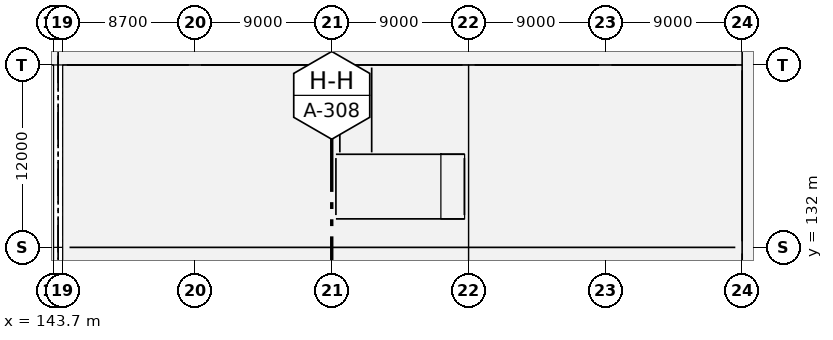
"""IFC4 building model, lengths in metres.
Left out: names, types, materials, properties, quantities, classifications, styles, units other than length and angle.
Written with IfcOpenShell. Run it as: python <this file> out.ifc"""

import sys

from ifc_helpers import new_model, si_unit, direction, frame, frame_2d, origin, origin_2d, place, context, subcontext, project, spatial, rectangle, extrude, element, fill, save


model = new_model("IFC4")
c1 = context("Model", 3, precision=1e-05, world=origin(), true_north=direction((0.0, 1.0)))
c2 = subcontext(c1, "Body", "Model", "MODEL_VIEW")
j1 = project(units=[si_unit("LENGTHUNIT", "METRE"), si_unit("PLANEANGLEUNIT", "RADIAN")], contexts=[c1])
p1 = place(None, origin())
s1 = spatial("IfcSite", under=j1, at=p1, CompositionType="ELEMENT")
p2 = place(p1, origin())
s2 = spatial("IfcBuilding", under=s1, at=p2, CompositionType="ELEMENT")
p3 = place(p2, origin())
s3 = spatial("IfcBuildingStorey", under=s2, at=p3, CompositionType="ELEMENT", Elevation=0.0)
for number, where, z_axis, x_axis in (
    (1, (143.7, 132.0, -0.5), (0.0, 0.0, 1.0), (1.0, 0.0, 0.0)),
    (2, (143.7, 144.0, -0.5), (0.0, 0.0, 1.0), (1.0, 0.0, 0.0)),
    (3, (144.3, 132.0, -0.5), (0.0, 0.0, 1.0), (1.0, 0.0, 0.0)),
    (4, (144.3, 144.0, -0.5), (0.0, 0.0, 1.0), (1.0, 0.0, 0.0)),
):
    element("IfcColumn", number, at=place(p3, frame(where, z_axis=z_axis, x_axis=x_axis)), inside=s3, PredefinedType="COLUMN", context=c2, shape_type="SweptSolid", body=[
        extrude(rectangle(XDim=0.55, YDim=0.75, at=origin_2d()), origin(), (0.0, 0.0, 1.0), 6.8),
    ])
p4 = place(p3, frame((153.0, 132.0, -0.5), z_axis=(0.0, 0.0, 1.0), x_axis=(1.0, 0.0, 0.0)))
e5 = element("IfcColumn", 5, at=p4, inside=s3, PredefinedType="COLUMN", context=c2, shape_type="SweptSolid", body=[
    extrude(rectangle(XDim=0.8, YDim=0.8, at=origin_2d()), origin(), (0.0, 0.0, 1.0), 6.8),
])
p5 = place(p3, frame((153.0, 144.0, -0.5), z_axis=(0.0, 0.0, 1.0), x_axis=(1.0, 0.0, 0.0)))
e6 = element("IfcColumn", 6, at=p5, inside=s3, PredefinedType="COLUMN", context=c2, shape_type="SweptSolid", body=[
    extrude(rectangle(XDim=0.8, YDim=0.7, at=origin_2d()), origin(), (0.0, 0.0, 1.0), 6.8),
])
p6 = place(p3, frame((162.0, 132.0, -0.5), z_axis=(0.0, 0.0, 1.0), x_axis=(1.0, 0.0, 0.0)))
e7 = element("IfcColumn", 7, at=p6, inside=s3, PredefinedType="COLUMN", context=c2, shape_type="SweptSolid", body=[
    extrude(rectangle(XDim=0.8, YDim=0.8, at=origin_2d()), origin(), (0.0, 0.0, 1.0), 6.8),
])
p7 = place(p3, frame((162.0, 144.0, -0.5), z_axis=(0.0, 0.0, 1.0), x_axis=(1.0, 0.0, 0.0)))
e8 = element("IfcColumn", 8, at=p7, inside=s3, PredefinedType="COLUMN", context=c2, shape_type="SweptSolid", body=[
    extrude(rectangle(XDim=0.8, YDim=0.7, at=origin_2d()), origin(), (0.0, 0.0, 1.0), 6.8),
])
p8 = place(p3, frame((171.0, 132.0, -0.5), z_axis=(0.0, 0.0, 1.0), x_axis=(1.0, 0.0, 0.0)))
e9 = element("IfcColumn", 9, at=p8, inside=s3, PredefinedType="COLUMN", context=c2, shape_type="SweptSolid", body=[
    extrude(rectangle(XDim=0.8, YDim=0.8, at=origin_2d()), origin(), (0.0, 0.0, 1.0), 6.8),
])
p9 = place(p3, frame((171.0, 144.0, -0.5), z_axis=(0.0, 0.0, 1.0), x_axis=(1.0, 0.0, 0.0)))
e10 = element("IfcColumn", 10, at=p9, inside=s3, PredefinedType="COLUMN", context=c2, shape_type="SweptSolid", body=[
    extrude(rectangle(XDim=0.8, YDim=0.7, at=origin_2d()), origin(), (0.0, 0.0, 1.0), 6.8),
])
for number, where, z_axis, x_axis in (
    (11, (180.0, 132.0, -0.5), (0.0, 0.0, 1.0), (1.0, 0.0, 0.0)),
    (12, (180.0, 144.0, -0.5), (0.0, 0.0, 1.0), (1.0, 0.0, 0.0)),
    (13, (189.0, 132.0, -0.5), (0.0, 0.0, 1.0), (1.0, 0.0, 0.0)),
):
    element("IfcColumn", number, at=place(p3, frame(where, z_axis=z_axis, x_axis=x_axis)), inside=s3, PredefinedType="COLUMN", context=c2, shape_type="SweptSolid", body=[
        extrude(rectangle(XDim=0.8, YDim=0.8, at=origin_2d()), origin(), (0.0, 0.0, 1.0), 6.8),
    ])
p10 = place(p3, frame((189.0, 144.0, -0.5), z_axis=(0.0, 0.0, 1.0), x_axis=(1.0, 0.0, 0.0)))
e14 = element("IfcColumn", 14, at=p10, inside=s3, PredefinedType="COLUMN", context=c2, shape_type="SweptSolid", body=[
    extrude(rectangle(XDim=0.8, YDim=0.7, at=origin_2d()), origin(), (0.0, 0.0, 1.0), 6.8),
])
p11 = place(p3, frame((144.575, 144.0, 0.0), z_axis=(0.0, 0.0, 1.0), x_axis=(1.0, 0.0, 0.0)))
e15 = element("IfcWall", 15, at=p11, inside=s3, PredefinedType="SOLIDWALL", context=c2, shape_type="SweptSolid", body=[
    extrude(rectangle(XDim=8.025, YDim=0.34, at=frame_2d((4.013, 0.0))), origin(), (0.0, 0.0, 1.0), 5.12),
])
p12 = place(p11, frame((2.812, 0.0, 0.0)))
e16 = element("IfcOpeningElement", 16, at=p12, cuts=e15, PredefinedType="OPENING", context=c2, shape_type="SweptSolid", body=[
    extrude(rectangle(XDim=2.4, YDim=3.1, at=frame_2d((1.2, 1.55))), frame((0.0, 0.18, 0.0), z_axis=(0.0, -1.0, 0.0), x_axis=(1.0, 0.0, 0.0)), (0.0, 0.0, 1.0), 0.36),
])
p13 = place(p3, frame((153.4, 144.0, 0.0), z_axis=(0.0, 0.0, 1.0), x_axis=(1.0, 0.0, 0.0)))
e17 = element("IfcWall", 17, at=p13, inside=s3, PredefinedType="SOLIDWALL", context=c2, shape_type="SweptSolid", body=[
    extrude(rectangle(XDim=8.2, YDim=0.34, at=frame_2d((4.1, 0.0))), origin(), (0.0, 0.0, 1.0), 5.12),
])
p14 = place(p13, frame((1.533, 0.0, 0.9)))
e18 = element("IfcOpeningElement", 18, at=p14, cuts=e17, PredefinedType="OPENING", context=c2, shape_type="SweptSolid", body=[
    extrude(rectangle(XDim=2.4, YDim=3.5, at=frame_2d((1.2, 1.75))), frame((0.0, 0.18, 0.0), z_axis=(0.0, -1.0, 0.0), x_axis=(1.0, 0.0, 0.0)), (0.0, 0.0, 1.0), 0.36),
])
p15 = place(p13, frame((4.267, 0.0, 0.9)))
e19 = element("IfcOpeningElement", 19, at=p15, cuts=e17, PredefinedType="OPENING", context=c2, shape_type="SweptSolid", body=[
    extrude(rectangle(XDim=2.4, YDim=3.5, at=frame_2d((1.2, 1.75))), frame((0.0, 0.18, 0.0), z_axis=(0.0, -1.0, 0.0), x_axis=(1.0, 0.0, 0.0)), (0.0, 0.0, 1.0), 0.36),
])
p16 = place(p3, frame((162.4, 144.0, 0.0), z_axis=(0.0, 0.0, 1.0), x_axis=(1.0, 0.0, 0.0)))
e20 = element("IfcWall", 20, at=p16, inside=s3, PredefinedType="SOLIDWALL", context=c2, shape_type="SweptSolid", body=[
    extrude(rectangle(XDim=8.2, YDim=0.34, at=frame_2d((4.1, 0.0))), origin(), (0.0, 0.0, 1.0), 5.12),
])
p17 = place(p16, frame((2.9, 0.0, 0.0)))
e21 = element("IfcOpeningElement", 21, at=p17, cuts=e20, PredefinedType="OPENING", context=c2, shape_type="SweptSolid", body=[
    extrude(rectangle(XDim=2.4, YDim=3.1, at=frame_2d((1.2, 1.55))), frame((0.0, 0.18, 0.0), z_axis=(0.0, -1.0, 0.0), x_axis=(1.0, 0.0, 0.0)), (0.0, 0.0, 1.0), 0.36),
])
p18 = place(p16, frame((0.4, 0.0, 0.0)))
e22 = element("IfcOpeningElement", 22, at=p18, cuts=e20, PredefinedType="OPENING", context=c2, shape_type="SweptSolid", body=[
    extrude(rectangle(XDim=1.2, YDim=2.25, at=frame_2d((0.6, 1.125))), frame((0.0, 0.18, 0.0), z_axis=(0.0, -1.0, 0.0), x_axis=(1.0, 0.0, 0.0)), (0.0, 0.0, 1.0), 0.36),
])
p19 = place(p3, frame((171.4, 144.0, 0.0), z_axis=(0.0, 0.0, 1.0), x_axis=(1.0, 0.0, 0.0)))
e23 = element("IfcWall", 23, at=p19, inside=s3, PredefinedType="SOLIDWALL", context=c2, shape_type="SweptSolid", body=[
    extrude(rectangle(XDim=8.2, YDim=0.34, at=frame_2d((4.1, 0.0))), origin(), (0.0, 0.0, 1.0), 5.12),
])
p20 = place(p19, frame((1.533, 0.0, 0.9)))
e24 = element("IfcOpeningElement", 24, at=p20, cuts=e23, PredefinedType="OPENING", context=c2, shape_type="SweptSolid", body=[
    extrude(rectangle(XDim=2.4, YDim=3.5, at=frame_2d((1.2, 1.75))), frame((0.0, 0.18, 0.0), z_axis=(0.0, -1.0, 0.0), x_axis=(1.0, 0.0, 0.0)), (0.0, 0.0, 1.0), 0.36),
])
p21 = place(p19, frame((4.267, 0.0, 0.9)))
e25 = element("IfcOpeningElement", 25, at=p21, cuts=e23, PredefinedType="OPENING", context=c2, shape_type="SweptSolid", body=[
    extrude(rectangle(XDim=2.4, YDim=3.5, at=frame_2d((1.2, 1.75))), frame((0.0, 0.18, 0.0), z_axis=(0.0, -1.0, 0.0), x_axis=(1.0, 0.0, 0.0)), (0.0, 0.0, 1.0), 0.36),
])
p22 = place(p3, frame((180.4, 144.0, 0.0), z_axis=(0.0, 0.0, 1.0), x_axis=(1.0, 0.0, 0.0)))
e26 = element("IfcWall", 26, at=p22, inside=s3, PredefinedType="SOLIDWALL", context=c2, shape_type="SweptSolid", body=[
    extrude(rectangle(XDim=8.2, YDim=0.34, at=frame_2d((4.1, 0.0))), origin(), (0.0, 0.0, 1.0), 5.12),
])
p23 = place(p22, frame((1.533, 0.0, 0.9)))
e27 = element("IfcOpeningElement", 27, at=p23, cuts=e26, PredefinedType="OPENING", context=c2, shape_type="SweptSolid", body=[
    extrude(rectangle(XDim=2.4, YDim=3.5, at=frame_2d((1.2, 1.75))), frame((0.0, 0.18, 0.0), z_axis=(0.0, -1.0, 0.0), x_axis=(1.0, 0.0, 0.0)), (0.0, 0.0, 1.0), 0.36),
])
p24 = place(p22, frame((4.267, 0.0, 0.9)))
e28 = element("IfcOpeningElement", 28, at=p24, cuts=e26, PredefinedType="OPENING", context=c2, shape_type="SweptSolid", body=[
    extrude(rectangle(XDim=2.4, YDim=3.5, at=frame_2d((1.2, 1.75))), frame((0.0, 0.18, 0.0), z_axis=(0.0, -1.0, 0.0), x_axis=(1.0, 0.0, 0.0)), (0.0, 0.0, 1.0), 0.36),
])
p25 = place(p3, frame((189.0, 120.0, 0.0), z_axis=(0.0, 0.0, 1.0), x_axis=(0.0, 1.0, 0.0)))
e29 = element("IfcWall", 29, at=p25, inside=s3, PredefinedType="SOLIDWALL", context=c2, shape_type="SweptSolid", body=[
    extrude(rectangle(XDim=11.6, YDim=0.34, at=frame_2d((5.8, 0.0))), origin(), (0.0, 0.0, 1.0), 6.3),
])
p26 = place(p25, frame((2.667, 0.0, 0.9)))
e30 = element("IfcOpeningElement", 30, at=p26, cuts=e29, PredefinedType="OPENING", context=c2, shape_type="SweptSolid", body=[
    extrude(rectangle(XDim=2.4, YDim=3.5, at=frame_2d((1.2, 1.75))), frame((0.0, 0.18, 0.0), z_axis=(0.0, -1.0, 0.0), x_axis=(1.0, 0.0, 0.0)), (0.0, 0.0, 1.0), 0.36),
])
p27 = place(p25, frame((6.533, 0.0, 0.9)))
e31 = element("IfcOpeningElement", 31, at=p27, cuts=e29, PredefinedType="OPENING", context=c2, shape_type="SweptSolid", body=[
    extrude(rectangle(XDim=2.4, YDim=3.5, at=frame_2d((1.2, 1.75))), frame((0.0, 0.18, 0.0), z_axis=(0.0, -1.0, 0.0), x_axis=(1.0, 0.0, 0.0)), (0.0, 0.0, 1.0), 0.36),
])
p28 = place(p3, frame((189.0, 132.4, 0.0), z_axis=(0.0, 0.0, 1.0), x_axis=(0.0, 1.0, 0.0)))
e32 = element("IfcWall", 32, at=p28, inside=s3, PredefinedType="SOLIDWALL", context=c2, shape_type="SweptSolid", body=[
    extrude(rectangle(XDim=11.25, YDim=0.34, at=frame_2d((5.625, 0.0))), origin(), (0.0, 0.0, 1.0), 4.97),
])
p29 = place(p28, frame((2.55, 0.0, 0.9)))
e33 = element("IfcOpeningElement", 33, at=p29, cuts=e32, PredefinedType="OPENING", context=c2, shape_type="SweptSolid", body=[
    extrude(rectangle(XDim=2.4, YDim=3.5, at=frame_2d((1.2, 1.75))), frame((0.0, 0.18, 0.0), z_axis=(0.0, -1.0, 0.0), x_axis=(1.0, 0.0, 0.0)), (0.0, 0.0, 1.0), 0.36),
])
p30 = place(p28, frame((6.3, 0.0, 0.9)))
e34 = element("IfcOpeningElement", 34, at=p30, cuts=e32, PredefinedType="OPENING", context=c2, shape_type="SweptSolid", body=[
    extrude(rectangle(XDim=2.4, YDim=3.5, at=frame_2d((1.2, 1.75))), frame((0.0, 0.18, 0.0), z_axis=(0.0, -1.0, 0.0), x_axis=(1.0, 0.0, 0.0)), (0.0, 0.0, 1.0), 0.36),
])
p31 = place(p3, frame((162.275, 133.875, -0.5), z_axis=(0.0, 0.0, 1.0), x_axis=(1.0, 0.0, 0.0)))
e35 = element("IfcWall", 35, at=p31, inside=s3, PredefinedType="SOLIDWALL", context=c2, shape_type="SweptSolid", body=[
    extrude(rectangle(XDim=8.45, YDim=0.25, at=frame_2d((4.225, 0.0))), origin(), (0.0, 0.0, 1.0), 6.8),
])
p32 = place(p3, frame((162.275, 138.125, -0.5), z_axis=(0.0, 0.0, 1.0), x_axis=(1.0, 0.0, 0.0)))
e36 = element("IfcWall", 36, at=p32, inside=s3, PredefinedType="SOLIDWALL", context=c2, shape_type="SweptSolid", body=[
    extrude(rectangle(XDim=8.45, YDim=0.25, at=frame_2d((4.225, 0.0))), origin(), (0.0, 0.0, 1.0), 6.8),
])
p33 = place(p32, frame((0.525, 0.0, 0.5)))
e37 = element("IfcOpeningElement", 37, at=p33, cuts=e36, PredefinedType="OPENING", context=c2, shape_type="SweptSolid", body=[
    extrude(rectangle(XDim=1.2, YDim=2.2, at=frame_2d((0.6, 1.1))), frame((0.0, 0.135, 0.0), z_axis=(0.0, -1.0, 0.0), x_axis=(1.0, 0.0, 0.0)), (0.0, 0.0, 1.0), 0.27),
])
p34 = place(p3, frame((162.275, 134.125, -0.5), z_axis=(0.0, 0.0, 1.0), x_axis=(0.0, 1.0, 0.0)))
e38 = element("IfcWall", 38, at=p34, inside=s3, PredefinedType="SOLIDWALL", context=c2, shape_type="SweptSolid", body=[
    extrude(rectangle(XDim=3.75, YDim=0.25, at=frame_2d((1.875, 0.0))), origin(), (0.0, 0.0, 1.0), 6.8),
])
p35 = place(p34, frame((1.1, 0.0, 0.5)))
e39 = element("IfcOpeningElement", 39, at=p35, cuts=e38, PredefinedType="OPENING", context=c2, shape_type="SweptSolid", body=[
    extrude(rectangle(XDim=1.2, YDim=2.2, at=frame_2d((0.6, 1.1))), frame((0.0, 0.135, 0.0), z_axis=(0.0, -1.0, 0.0), x_axis=(1.0, 0.0, 0.0)), (0.0, 0.0, 1.0), 0.27),
])
p36 = place(p3, frame((170.725, 134.125, -0.5), z_axis=(0.0, 0.0, 1.0), x_axis=(0.0, 1.0, 0.0)))
e40 = element("IfcWall", 40, at=p36, inside=s3, PredefinedType="SOLIDWALL", context=c2, shape_type="SweptSolid", body=[
    extrude(rectangle(XDim=3.75, YDim=0.25, at=frame_2d((1.875, 0.0))), origin(), (0.0, 0.0, 1.0), 6.8),
])
p37 = place(p3, frame((144.75, 132.0, 0.0), z_axis=(0.0, 0.0, 1.0), x_axis=(1.0, 0.0, 0.0)))
e41 = element("IfcWall", 41, at=p37, inside=s3, PredefinedType="PARTITIONING", context=c2, shape_type="SweptSolid", body=[
    extrude(rectangle(XDim=43.8, YDim=0.125, at=frame_2d((21.9, 0.0))), origin(), (0.0, 0.0, 1.0), 5.27),
])
p38 = place(p37, frame((12.25, 0.0, 0.0)))
e42 = element("IfcOpeningElement", 42, at=p38, cuts=e41, PredefinedType="OPENING", context=c2, shape_type="SweptSolid", body=[
    extrude(rectangle(XDim=1.0, YDim=2.15, at=frame_2d((0.5, 1.075))), frame((0.0, 0.073, 0.0), z_axis=(0.0, -1.0, 0.0), x_axis=(1.0, 0.0, 0.0)), (0.0, 0.0, 1.0), 0.145),
])
for number, where, z_axis, x_axis in (
    (43, (162.532, 138.25, 0.0), (0.0, 0.0, 1.0), (0.0, 1.0, 0.0)),
    (44, (164.627, 138.25, 0.0), (0.0, 0.0, 1.0), (0.0, 1.0, 0.0)),
):
    element("IfcWall", number, at=place(p3, frame(where, z_axis=z_axis, x_axis=x_axis)), inside=s3, PredefinedType="STANDARD", context=c2, shape_type="SweptSolid", body=[
        extrude(rectangle(XDim=5.58, YDim=0.255, at=frame_2d((2.79, 0.0))), origin(), (0.0, 0.0, 1.0), 5.95),
    ])
p39 = place(p12, origin())
e45 = element("IfcDoor", 45, at=p39, inside=s3, OperationType="DOUBLE_DOOR_SINGLE_SWING", PredefinedType="DOOR", context=c2, shape_type="SweptSolid", body=[
    extrude(rectangle(XDim=2.4, YDim=3.1, at=frame_2d((1.2, 1.55))), frame((0.0, 0.025, 0.0), z_axis=(0.0, -1.0, 0.0), x_axis=(1.0, 0.0, 0.0)), (0.0, 0.0, 1.0), 0.05),
])
fill(e16, e45)
p40 = place(p14, origin())
e46 = element("IfcWindow", 46, at=p40, inside=s3, PartitioningType="TRIPLE_PANEL_VERTICAL", PredefinedType="WINDOW", context=c2, shape_type="SweptSolid", body=[
    extrude(rectangle(XDim=2.4, YDim=3.5, at=frame_2d((1.2, 1.75))), frame((0.0, 0.03, 0.0), z_axis=(0.0, -1.0, 0.0), x_axis=(1.0, 0.0, 0.0)), (0.0, 0.0, 1.0), 0.06),
])
fill(e18, e46)
p41 = place(p15, origin())
e47 = element("IfcWindow", 47, at=p41, inside=s3, PartitioningType="TRIPLE_PANEL_VERTICAL", PredefinedType="WINDOW", context=c2, shape_type="SweptSolid", body=[
    extrude(rectangle(XDim=2.4, YDim=3.5, at=frame_2d((1.2, 1.75))), frame((0.0, 0.03, 0.0), z_axis=(0.0, -1.0, 0.0), x_axis=(1.0, 0.0, 0.0)), (0.0, 0.0, 1.0), 0.06),
])
fill(e19, e47)
p42 = place(p17, origin())
e48 = element("IfcDoor", 48, at=p42, inside=s3, OperationType="DOUBLE_DOOR_SINGLE_SWING", PredefinedType="DOOR", context=c2, shape_type="SweptSolid", body=[
    extrude(rectangle(XDim=2.4, YDim=3.1, at=frame_2d((1.2, 1.55))), frame((0.0, 0.025, 0.0), z_axis=(0.0, -1.0, 0.0), x_axis=(1.0, 0.0, 0.0)), (0.0, 0.0, 1.0), 0.05),
])
fill(e21, e48)
p43 = place(p20, origin())
e49 = element("IfcWindow", 49, at=p43, inside=s3, PartitioningType="TRIPLE_PANEL_VERTICAL", PredefinedType="WINDOW", context=c2, shape_type="SweptSolid", body=[
    extrude(rectangle(XDim=2.4, YDim=3.5, at=frame_2d((1.2, 1.75))), frame((0.0, 0.03, 0.0), z_axis=(0.0, -1.0, 0.0), x_axis=(1.0, 0.0, 0.0)), (0.0, 0.0, 1.0), 0.06),
])
fill(e24, e49)
p44 = place(p21, origin())
e50 = element("IfcWindow", 50, at=p44, inside=s3, PartitioningType="TRIPLE_PANEL_VERTICAL", PredefinedType="WINDOW", context=c2, shape_type="SweptSolid", body=[
    extrude(rectangle(XDim=2.4, YDim=3.5, at=frame_2d((1.2, 1.75))), frame((0.0, 0.03, 0.0), z_axis=(0.0, -1.0, 0.0), x_axis=(1.0, 0.0, 0.0)), (0.0, 0.0, 1.0), 0.06),
])
fill(e25, e50)
p45 = place(p23, origin())
e51 = element("IfcWindow", 51, at=p45, inside=s3, PartitioningType="TRIPLE_PANEL_VERTICAL", PredefinedType="WINDOW", context=c2, shape_type="SweptSolid", body=[
    extrude(rectangle(XDim=2.4, YDim=3.5, at=frame_2d((1.2, 1.75))), frame((0.0, 0.03, 0.0), z_axis=(0.0, -1.0, 0.0), x_axis=(1.0, 0.0, 0.0)), (0.0, 0.0, 1.0), 0.06),
])
fill(e27, e51)
p46 = place(p24, origin())
e52 = element("IfcWindow", 52, at=p46, inside=s3, PartitioningType="TRIPLE_PANEL_VERTICAL", PredefinedType="WINDOW", context=c2, shape_type="SweptSolid", body=[
    extrude(rectangle(XDim=2.4, YDim=3.5, at=frame_2d((1.2, 1.75))), frame((0.0, 0.03, 0.0), z_axis=(0.0, -1.0, 0.0), x_axis=(1.0, 0.0, 0.0)), (0.0, 0.0, 1.0), 0.06),
])
fill(e28, e52)
p47 = place(p29, origin())
e53 = element("IfcWindow", 53, at=p47, inside=s3, PartitioningType="TRIPLE_PANEL_VERTICAL", PredefinedType="WINDOW", context=c2, shape_type="SweptSolid", body=[
    extrude(rectangle(XDim=2.4, YDim=3.5, at=frame_2d((1.2, 1.75))), frame((0.0, 0.03, 0.0), z_axis=(0.0, -1.0, 0.0), x_axis=(1.0, 0.0, 0.0)), (0.0, 0.0, 1.0), 0.06),
])
fill(e33, e53)
p48 = place(p30, origin())
e54 = element("IfcWindow", 54, at=p48, inside=s3, PartitioningType="TRIPLE_PANEL_VERTICAL", PredefinedType="WINDOW", context=c2, shape_type="SweptSolid", body=[
    extrude(rectangle(XDim=2.4, YDim=3.5, at=frame_2d((1.2, 1.75))), frame((0.0, 0.03, 0.0), z_axis=(0.0, -1.0, 0.0), x_axis=(1.0, 0.0, 0.0)), (0.0, 0.0, 1.0), 0.06),
])
fill(e34, e54)
p49 = place(p35, origin())
e55 = element("IfcDoor", 55, at=p49, inside=s3, OperationType="SINGLE_SWING_LEFT", PredefinedType="DOOR", context=c2, shape_type="SweptSolid", body=[
    extrude(rectangle(XDim=1.2, YDim=2.2, at=frame_2d((0.6, 1.1))), frame((0.0, 0.025, 0.0), z_axis=(0.0, -1.0, 0.0), x_axis=(1.0, 0.0, 0.0)), (0.0, 0.0, 1.0), 0.05),
])
fill(e39, e55)
p50 = place(p38, origin())
e56 = element("IfcDoor", 56, at=p50, inside=s3, OperationType="SINGLE_SWING_LEFT", PredefinedType="DOOR", context=c2, shape_type="SweptSolid", body=[
    extrude(rectangle(XDim=1.0, YDim=2.15, at=frame_2d((0.5, 1.075))), frame((0.0, 0.025, 0.0), z_axis=(0.0, -1.0, 0.0), x_axis=(1.0, 0.0, 0.0)), (0.0, 0.0, 1.0), 0.05),
])
fill(e42, e56)
p51 = place(p33, origin())
e57 = element("IfcDoor", 57, at=p51, inside=s3, OperationType="SINGLE_SWING_RIGHT", PredefinedType="DOOR", context=c2, shape_type="SweptSolid", body=[
    extrude(rectangle(XDim=1.2, YDim=2.2, at=frame_2d((0.6, 1.1))), frame((0.0, 0.025, 0.0), z_axis=(0.0, -1.0, 0.0), x_axis=(1.0, 0.0, 0.0)), (0.0, 0.0, 1.0), 0.05),
])
fill(e37, e57)
p52 = place(p18, origin())
e58 = element("IfcDoor", 58, at=p52, inside=s3, OperationType="SINGLE_SWING_LEFT", PredefinedType="DOOR", context=c2, shape_type="SweptSolid", body=[
    extrude(rectangle(XDim=1.2, YDim=2.25, at=frame_2d((0.6, 1.125))), frame((0.0, 0.025, 0.0), z_axis=(0.0, -1.0, 0.0), x_axis=(1.0, 0.0, 0.0)), (0.0, 0.0, 1.0), 0.05),
])
fill(e22, e58)
save(model, sys.argv[1])
